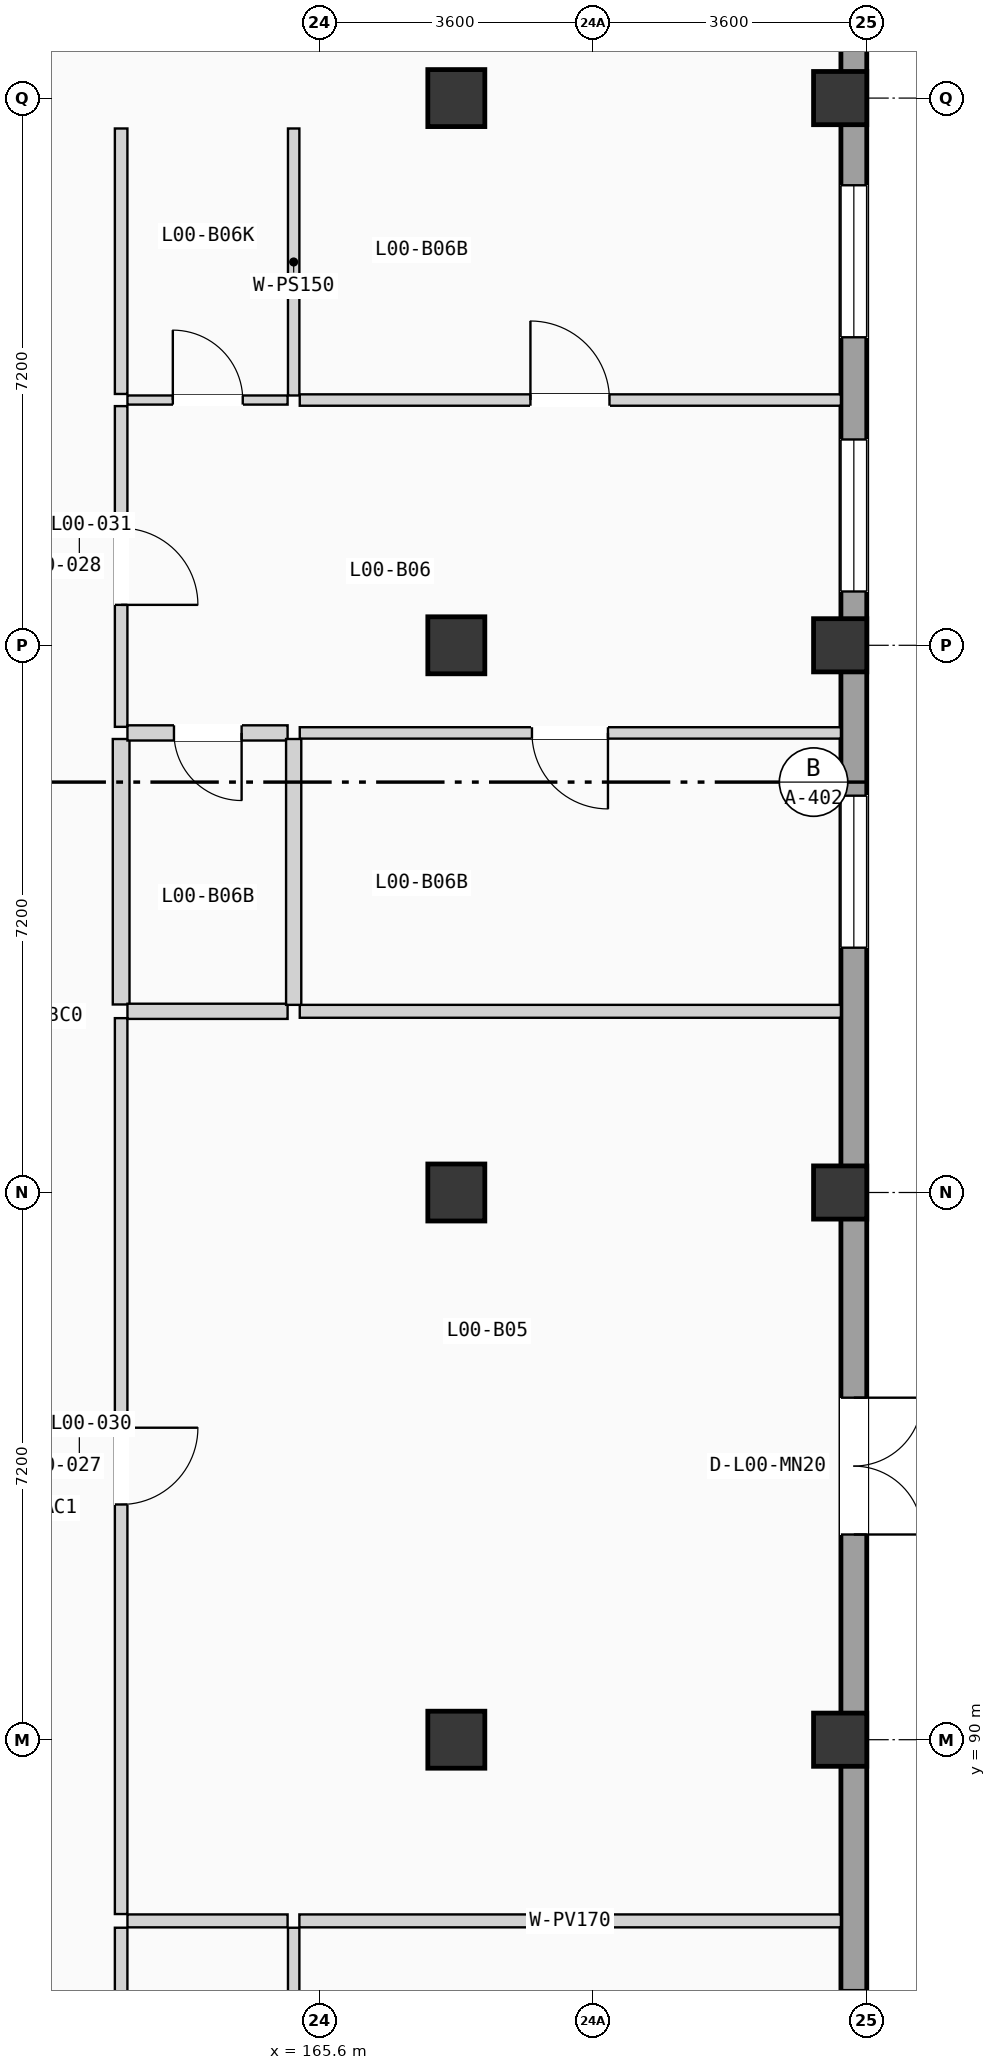
"""IFC4 building model, lengths in metres.
Left out: names, types, materials, properties, quantities, classifications, styles, units other than length and angle.
Written with IfcOpenShell. Run it as: python <this file> out.ifc"""

import sys

from ifc_helpers import new_model, si_unit, direction, frame, frame_2d, origin, origin_2d, place, context, subcontext, project, spatial, rectangle, extrude, element, fill, save


model = new_model("IFC4")
c1 = context("Model", 3, precision=1e-05, world=origin(), true_north=direction((0.0, 1.0)))
c2 = subcontext(c1, "Body", "Model", "MODEL_VIEW")
j1 = project(units=[si_unit("LENGTHUNIT", "METRE"), si_unit("PLANEANGLEUNIT", "RADIAN")], contexts=[c1])
p1 = place(None, origin())
s1 = spatial("IfcSite", under=j1, at=p1, CompositionType="ELEMENT")
p2 = place(p1, origin())
s2 = spatial("IfcBuilding", under=s1, at=p2, CompositionType="ELEMENT")
p3 = place(p2, origin())
s3 = spatial("IfcBuildingStorey", under=s2, at=p3, CompositionType="ELEMENT", Elevation=0.0)
for number, where, z_axis, x_axis in (
    (1, (167.4, 90.0, 0.0), (0.0, 0.0, 1.0), (1.0, 0.0, 0.0)),
    (2, (167.4, 97.2, 0.0), (0.0, 0.0, 1.0), (1.0, 0.0, 0.0)),
    (3, (167.4, 104.4, 0.0), (0.0, 0.0, 1.0), (1.0, 0.0, 0.0)),
    (4, (167.4, 111.6, 0.0), (0.0, 0.0, 1.0), (1.0, 0.0, 0.0)),
):
    element("IfcColumn", number, at=place(p3, frame(where, z_axis=z_axis, x_axis=x_axis)), inside=s3, PredefinedType="COLUMN", context=c2, shape_type="SweptSolid", body=[
        extrude(rectangle(XDim=0.75, YDim=0.75, at=origin_2d()), origin(), (0.0, 0.0, 1.0), 4.9),
    ])
for number, where, z_axis, x_axis in (
    (5, (172.45, 90.0, 0.0), (0.0, 0.0, 1.0), (1.0, 0.0, 0.0)),
    (6, (172.45, 97.2, 0.0), (0.0, 0.0, 1.0), (1.0, 0.0, 0.0)),
    (7, (172.45, 104.4, 0.0), (0.0, 0.0, 1.0), (1.0, 0.0, 0.0)),
    (8, (172.45, 111.6, 0.0), (0.0, 0.0, 1.0), (1.0, 0.0, 0.0)),
):
    element("IfcColumn", number, at=place(p3, frame(where, z_axis=z_axis, x_axis=x_axis)), inside=s3, PredefinedType="COLUMN", context=c2, shape_type="SweptSolid", body=[
        extrude(rectangle(XDim=0.7, YDim=0.7, at=origin_2d()), origin(), (0.0, 0.0, 1.0), 4.9),
    ])
p4 = place(p3, frame((172.63, 68.74, 0.0), z_axis=(0.0, 0.0, 1.0), x_axis=(0.0, 1.0, 0.0)))
e9 = element("IfcWall", 9, at=p4, inside=s3, PredefinedType="SOLIDWALL", context=c2, shape_type="SweptSolid", body=[
    extrude(rectangle(XDim=49.72, YDim=0.34, at=frame_2d((24.86, 0.0))), origin(), (0.0, 0.0, 1.0), 4.64),
])
p5 = place(p4, frame((23.96, 0.0, 0.0)))
e10 = element("IfcOpeningElement", 10, at=p5, cuts=e9, PredefinedType="OPENING", context=c2, shape_type="SweptSolid", body=[
    extrude(rectangle(XDim=1.8, YDim=2.35, at=frame_2d((0.9, 1.175))), frame((0.0, 0.18, 0.0), z_axis=(0.0, -1.0, 0.0), x_axis=(1.0, 0.0, 0.0)), (0.0, 0.0, 1.0), 0.36),
])
p6 = place(p4, frame((11.427, 0.0, 0.9)))
e11 = element("IfcOpeningElement", 11, at=p6, cuts=e9, PredefinedType="OPENING", context=c2, shape_type="SweptSolid", body=[
    extrude(rectangle(XDim=1.85, YDim=1.5, at=frame_2d((0.925, 0.75))), frame((0.0, 0.18, 0.0), z_axis=(0.0, -1.0, 0.0), x_axis=(1.0, 0.0, 0.0)), (0.0, 0.0, 1.0), 0.36),
])
p7 = place(p4, frame((8.082, 0.0, 0.9)))
e12 = element("IfcOpeningElement", 12, at=p7, cuts=e9, PredefinedType="OPENING", context=c2, shape_type="SweptSolid", body=[
    extrude(rectangle(XDim=1.85, YDim=1.65, at=frame_2d((0.925, 0.825))), frame((0.0, 0.18, 0.0), z_axis=(0.0, -1.0, 0.0), x_axis=(1.0, 0.0, 0.0)), (0.0, 0.0, 1.0), 0.36),
])
p8 = place(p4, frame((16.115, 0.0, 0.9)))
e13 = element("IfcOpeningElement", 13, at=p8, cuts=e9, PredefinedType="OPENING", context=c2, shape_type="SweptSolid", body=[
    extrude(rectangle(XDim=1.85, YDim=1.8, at=frame_2d((0.925, 0.9))), frame((0.0, 0.18, 0.0), z_axis=(0.0, -1.0, 0.0), x_axis=(1.0, 0.0, 0.0)), (0.0, 0.0, 1.0), 0.36),
])
p9 = place(p4, frame((36.368, 0.0, 0.9)))
e14 = element("IfcOpeningElement", 14, at=p9, cuts=e9, PredefinedType="OPENING", context=c2, shape_type="SweptSolid", body=[
    extrude(rectangle(XDim=2.0, YDim=1.2, at=frame_2d((1.0, 0.6))), frame((0.0, 0.18, 0.0), z_axis=(0.0, -1.0, 0.0), x_axis=(1.0, 0.0, 0.0)), (0.0, 0.0, 1.0), 0.36),
])
p10 = place(p4, frame((31.681, 0.0, 0.9)))
e15 = element("IfcOpeningElement", 15, at=p10, cuts=e9, PredefinedType="OPENING", context=c2, shape_type="SweptSolid", body=[
    extrude(rectangle(XDim=2.0, YDim=1.35, at=frame_2d((1.0, 0.675))), frame((0.0, 0.18, 0.0), z_axis=(0.0, -1.0, 0.0), x_axis=(1.0, 0.0, 0.0)), (0.0, 0.0, 1.0), 0.36),
])
p11 = place(p4, frame((39.713, 0.0, 0.9)))
e16 = element("IfcOpeningElement", 16, at=p11, cuts=e9, PredefinedType="OPENING", context=c2, shape_type="SweptSolid", body=[
    extrude(rectangle(XDim=2.0, YDim=1.5, at=frame_2d((1.0, 0.75))), frame((0.0, 0.18, 0.0), z_axis=(0.0, -1.0, 0.0), x_axis=(1.0, 0.0, 0.0)), (0.0, 0.0, 1.0), 0.36),
])
p12 = place(p3, frame((162.99, 84.033, 0.0), z_axis=(0.0, 0.0, 1.0), x_axis=(0.0, 1.0, 0.0)))
e17 = element("IfcWall", 17, at=p12, inside=s3, PredefinedType="PARTITIONING", context=c2, shape_type="SweptSolid", body=[
    extrude(rectangle(XDim=3.493, YDim=0.165, at=frame_2d((1.747, 0.0))), origin(), (0.0, 0.0, 1.0), 3.84),
])
p13 = place(p3, frame((162.99, 87.706, 0.0), z_axis=(0.0, 0.0, 1.0), x_axis=(0.0, 1.0, 0.0)))
e18 = element("IfcWall", 18, at=p13, inside=s3, PredefinedType="PARTITIONING", context=c2, shape_type="SweptSolid", body=[
    extrude(rectangle(XDim=11.788, YDim=0.165, at=frame_2d((5.894, 0.0))), origin(), (0.0, 0.0, 1.0), 3.84),
])
p14 = place(p13, frame((5.389, 0.0, 0.0)))
e19 = element("IfcOpeningElement", 19, at=p14, cuts=e18, PredefinedType="OPENING", context=c2, shape_type="SweptSolid", body=[
    extrude(rectangle(XDim=1.01, YDim=2.11, at=frame_2d((0.505, 1.055))), frame((0.0, 0.093, 0.0), z_axis=(0.0, -1.0, 0.0), x_axis=(1.0, 0.0, 0.0)), (0.0, 0.0, 1.0), 0.185),
])
p15 = place(p3, frame((162.99, 103.327, 0.0), z_axis=(0.0, 0.0, 1.0), x_axis=(0.0, 1.0, 0.0)))
e20 = element("IfcWall", 20, at=p15, inside=s3, PredefinedType="PARTITIONING", context=c2, shape_type="SweptSolid", body=[
    extrude(rectangle(XDim=4.22, YDim=0.165, at=frame_2d((2.11, 0.0))), origin(), (0.0, 0.0, 1.0), 3.84),
])
p16 = place(p15, frame((1.605, 0.0, 0.0)))
e21 = element("IfcOpeningElement", 21, at=p16, cuts=e20, PredefinedType="OPENING", context=c2, shape_type="SweptSolid", body=[
    extrude(rectangle(XDim=1.01, YDim=2.11, at=frame_2d((0.505, 1.055))), frame((0.0, 0.093, 0.0), z_axis=(0.0, -1.0, 0.0), x_axis=(1.0, 0.0, 0.0)), (0.0, 0.0, 1.0), 0.185),
])
p17 = place(p3, frame((162.99, 99.674, 0.0), z_axis=(0.0, 0.0, 1.0), x_axis=(0.0, 1.0, 0.0)))
e22 = element("IfcWall", 22, at=p17, inside=s3, PredefinedType="PLUMBINGWALL", context=c2, shape_type="SweptSolid", body=[
    extrude(rectangle(XDim=3.493, YDim=0.22, at=frame_2d((1.747, 0.0))), origin(), (0.0, 0.0, 1.0), 3.84),
])
p18 = place(p3, frame((162.99, 107.707, 0.0), z_axis=(0.0, 0.0, 1.0), x_axis=(0.0, 1.0, 0.0)))
e23 = element("IfcWall", 23, at=p18, inside=s3, PredefinedType="PARTITIONING", context=c2, shape_type="SweptSolid", body=[
    extrude(rectangle(XDim=3.493, YDim=0.165, at=frame_2d((1.747, 0.0))), origin(), (0.0, 0.0, 1.0), 3.84),
])
p19 = place(p3, frame((165.26, 84.013, 0.0), z_axis=(0.0, 0.0, 1.0), x_axis=(0.0, 1.0, 0.0)))
e24 = element("IfcWall", 24, at=p19, inside=s3, PredefinedType="PARTITIONING", context=c2, shape_type="SweptSolid", body=[
    extrude(rectangle(XDim=3.513, YDim=0.15, at=frame_2d((1.756, 0.0))), origin(), (0.0, 0.0, 1.0), 3.84),
])
p20 = place(p3, frame((163.073, 87.616, 0.0), z_axis=(0.0, 0.0, 1.0), x_axis=(1.0, 0.0, 0.0)))
e25 = element("IfcWall", 25, at=p20, inside=s3, PredefinedType="PARTITIONING", context=c2, shape_type="SweptSolid", body=[
    extrude(rectangle(XDim=2.107, YDim=0.17, at=frame_2d((1.053, 0.0))), origin(), (0.0, 0.0, 1.0), 3.84),
])
p21 = place(p3, frame((165.335, 87.616, 0.0), z_axis=(0.0, 0.0, 1.0), x_axis=(1.0, 0.0, 0.0)))
e26 = element("IfcWall", 26, at=p21, inside=s3, PredefinedType="PARTITIONING", context=c2, shape_type="SweptSolid", body=[
    extrude(rectangle(XDim=7.125, YDim=0.17, at=frame_2d((3.562, 0.0))), origin(), (0.0, 0.0, 1.0), 3.84),
])
p22 = place(p3, frame((163.073, 99.584, 0.0), z_axis=(0.0, 0.0, 1.0), x_axis=(1.0, 0.0, 0.0)))
e27 = element("IfcWall", 27, at=p22, inside=s3, PredefinedType="PLUMBINGWALL", context=c2, shape_type="SweptSolid", body=[
    extrude(rectangle(XDim=2.107, YDim=0.2, at=frame_2d((1.053, 0.0))), origin(), (0.0, 0.0, 1.0), 3.84),
])
p23 = place(p3, frame((165.34, 99.584, 0.0), z_axis=(0.0, 0.0, 1.0), x_axis=(1.0, 0.0, 0.0)))
e28 = element("IfcWall", 28, at=p23, inside=s3, PredefinedType="PARTITIONING", context=c2, shape_type="SweptSolid", body=[
    extrude(rectangle(XDim=7.12, YDim=0.17, at=frame_2d((3.56, 0.0))), origin(), (0.0, 0.0, 1.0), 3.84),
])
p24 = place(p3, frame((163.073, 103.247, 0.0), z_axis=(0.0, 0.0, 1.0), x_axis=(1.0, 0.0, 0.0)))
e29 = element("IfcWall", 29, at=p24, inside=s3, PredefinedType="PLUMBINGWALL", context=c2, shape_type="SweptSolid", body=[
    extrude(rectangle(XDim=2.107, YDim=0.2, at=frame_2d((1.053, 0.0))), origin(), (0.0, 0.0, 1.0), 3.84),
])
p25 = place(p24, frame((0.612, 0.0, 0.0)))
e30 = element("IfcOpeningElement", 30, at=p25, cuts=e29, PredefinedType="OPENING", context=c2, shape_type="SweptSolid", body=[
    extrude(rectangle(XDim=0.89, YDim=2.03, at=frame_2d((0.445, 1.015))), frame((0.0, 0.11, 0.0), z_axis=(0.0, -1.0, 0.0), x_axis=(1.0, 0.0, 0.0)), (0.0, 0.0, 1.0), 0.22),
])
p26 = place(p3, frame((163.073, 107.627, 0.0), z_axis=(0.0, 0.0, 1.0), x_axis=(1.0, 0.0, 0.0)))
e31 = element("IfcWall", 31, at=p26, inside=s3, PredefinedType="PARTITIONING", context=c2, shape_type="SweptSolid", body=[
    extrude(rectangle(XDim=2.107, YDim=0.12, at=frame_2d((1.053, 0.0))), origin(), (0.0, 0.0, 1.0), 3.84),
])
p27 = place(p26, frame((0.597, 0.0, 0.0)))
e32 = element("IfcOpeningElement", 32, at=p27, cuts=e31, PredefinedType="OPENING", context=c2, shape_type="SweptSolid", body=[
    extrude(rectangle(XDim=0.92, YDim=2.02, at=frame_2d((0.46, 1.01))), frame((0.0, 0.07, 0.0), z_axis=(0.0, -1.0, 0.0), x_axis=(1.0, 0.0, 0.0)), (0.0, 0.0, 1.0), 0.14),
])
p28 = place(p3, frame((165.34, 103.247, 0.0), z_axis=(0.0, 0.0, 1.0), x_axis=(1.0, 0.0, 0.0)))
e33 = element("IfcWall", 33, at=p28, inside=s3, PredefinedType="PARTITIONING", context=c2, shape_type="SweptSolid", body=[
    extrude(rectangle(XDim=7.12, YDim=0.15, at=frame_2d((3.56, 0.0))), origin(), (0.0, 0.0, 1.0), 3.84),
])
p29 = place(p28, frame((3.055, 0.0, 0.0)))
e34 = element("IfcOpeningElement", 34, at=p29, cuts=e33, PredefinedType="OPENING", context=c2, shape_type="SweptSolid", body=[
    extrude(rectangle(XDim=1.0, YDim=2.06, at=frame_2d((0.5, 1.03))), frame((0.0, 0.085, 0.0), z_axis=(0.0, -1.0, 0.0), x_axis=(1.0, 0.0, 0.0)), (0.0, 0.0, 1.0), 0.17),
])
p30 = place(p3, frame((165.34, 107.627, 0.0), z_axis=(0.0, 0.0, 1.0), x_axis=(1.0, 0.0, 0.0)))
e35 = element("IfcWall", 35, at=p30, inside=s3, PredefinedType="PARTITIONING", context=c2, shape_type="SweptSolid", body=[
    extrude(rectangle(XDim=7.12, YDim=0.15, at=frame_2d((3.56, 0.0))), origin(), (0.0, 0.0, 1.0), 3.84),
])
p31 = place(p30, frame((3.035, 0.0, 0.0)))
e36 = element("IfcOpeningElement", 36, at=p31, cuts=e35, PredefinedType="OPENING", context=c2, shape_type="SweptSolid", body=[
    extrude(rectangle(XDim=1.04, YDim=2.08, at=frame_2d((0.52, 1.04))), frame((0.0, 0.085, 0.0), z_axis=(0.0, -1.0, 0.0), x_axis=(1.0, 0.0, 0.0)), (0.0, 0.0, 1.0), 0.17),
])
p32 = place(p3, frame((165.26, 99.669, 0.0), z_axis=(0.0, 0.0, 1.0), x_axis=(0.0, 1.0, 0.0)))
e37 = element("IfcWall", 37, at=p32, inside=s3, PredefinedType="PLUMBINGWALL", context=c2, shape_type="SweptSolid", body=[
    extrude(rectangle(XDim=3.498, YDim=0.2, at=frame_2d((1.749, 0.0))), origin(), (0.0, 0.0, 1.0), 3.84),
])
p33 = place(p3, frame((165.26, 107.687, 0.0), z_axis=(0.0, 0.0, 1.0), x_axis=(0.0, 1.0, 0.0)))
e38 = element("IfcWall", 38, at=p33, inside=s3, PredefinedType="PARTITIONING", context=c2, shape_type="SweptSolid", body=[
    extrude(rectangle(XDim=3.513, YDim=0.15, at=frame_2d((1.756, 0.0))), origin(), (0.0, 0.0, 1.0), 3.84),
])
p34 = place(p5, frame((1.8, 0.0, 0.0), z_axis=(0.0, 0.0, 1.0), x_axis=(-1.0, 0.0, 0.0)))
e39 = element("IfcDoor", 39, at=p34, inside=s3, OperationType="DOUBLE_DOOR_SINGLE_SWING", PredefinedType="DOOR", context=c2, shape_type="SweptSolid", body=[
    extrude(rectangle(XDim=1.8, YDim=2.35, at=frame_2d((0.9, 1.175))), frame((0.0, 0.025, 0.0), z_axis=(0.0, -1.0, 0.0), x_axis=(1.0, 0.0, 0.0)), (0.0, 0.0, 1.0), 0.05),
])
fill(e10, e39)
p35 = place(p9, origin())
e40 = element("IfcWindow", 40, at=p35, inside=s3, PartitioningType="DOUBLE_PANEL_VERTICAL", PredefinedType="WINDOW", context=c2, shape_type="SweptSolid", body=[
    extrude(rectangle(XDim=2.0, YDim=1.2, at=frame_2d((1.0, 0.6))), frame((0.0, 0.03, 0.0), z_axis=(0.0, -1.0, 0.0), x_axis=(1.0, 0.0, 0.0)), (0.0, 0.0, 1.0), 0.06),
])
fill(e14, e40)
p36 = place(p10, origin())
e41 = element("IfcWindow", 41, at=p36, inside=s3, PartitioningType="DOUBLE_PANEL_VERTICAL", PredefinedType="WINDOW", context=c2, shape_type="SweptSolid", body=[
    extrude(rectangle(XDim=2.0, YDim=1.35, at=frame_2d((1.0, 0.675))), frame((0.0, 0.03, 0.0), z_axis=(0.0, -1.0, 0.0), x_axis=(1.0, 0.0, 0.0)), (0.0, 0.0, 1.0), 0.06),
])
fill(e15, e41)
p37 = place(p11, origin())
e42 = element("IfcWindow", 42, at=p37, inside=s3, PartitioningType="DOUBLE_PANEL_VERTICAL", PredefinedType="WINDOW", context=c2, shape_type="SweptSolid", body=[
    extrude(rectangle(XDim=2.0, YDim=1.5, at=frame_2d((1.0, 0.75))), frame((0.0, 0.03, 0.0), z_axis=(0.0, -1.0, 0.0), x_axis=(1.0, 0.0, 0.0)), (0.0, 0.0, 1.0), 0.06),
])
fill(e16, e42)
p38 = place(p14, frame((1.01, 0.0, 0.0), z_axis=(0.0, 0.0, 1.0), x_axis=(-1.0, 0.0, 0.0)))
e43 = element("IfcDoor", 43, at=p38, inside=s3, OperationType="SINGLE_SWING_RIGHT", PredefinedType="DOOR", context=c2, shape_type="SweptSolid", body=[
    extrude(rectangle(XDim=1.01, YDim=2.11, at=frame_2d((0.505, 1.055))), frame((0.0, 0.025, 0.0), z_axis=(0.0, -1.0, 0.0), x_axis=(1.0, 0.0, 0.0)), (0.0, 0.0, 1.0), 0.05),
])
fill(e19, e43)
p39 = place(p16, frame((1.01, 0.0, 0.0), z_axis=(0.0, 0.0, 1.0), x_axis=(-1.0, 0.0, 0.0)))
e44 = element("IfcDoor", 44, at=p39, inside=s3, OperationType="SINGLE_SWING_LEFT", PredefinedType="DOOR", context=c2, shape_type="SweptSolid", body=[
    extrude(rectangle(XDim=1.01, YDim=2.11, at=frame_2d((0.505, 1.055))), frame((0.0, 0.025, 0.0), z_axis=(0.0, -1.0, 0.0), x_axis=(1.0, 0.0, 0.0)), (0.0, 0.0, 1.0), 0.05),
])
fill(e21, e44)
p40 = place(p25, frame((0.89, 0.0, 0.0), z_axis=(0.0, 0.0, 1.0), x_axis=(-1.0, 0.0, 0.0)))
e45 = element("IfcDoor", 45, at=p40, inside=s3, OperationType="SINGLE_SWING_RIGHT", PredefinedType="DOOR", context=c2, shape_type="SweptSolid", body=[
    extrude(rectangle(XDim=0.89, YDim=2.03, at=frame_2d((0.445, 1.015))), frame((0.0, 0.025, 0.0), z_axis=(0.0, -1.0, 0.0), x_axis=(1.0, 0.0, 0.0)), (0.0, 0.0, 1.0), 0.05),
])
fill(e30, e45)
p41 = place(p27, origin())
e46 = element("IfcDoor", 46, at=p41, inside=s3, OperationType="SINGLE_SWING_LEFT", PredefinedType="DOOR", context=c2, shape_type="SweptSolid", body=[
    extrude(rectangle(XDim=0.92, YDim=2.02, at=frame_2d((0.46, 1.01))), frame((0.0, 0.025, 0.0), z_axis=(0.0, -1.0, 0.0), x_axis=(1.0, 0.0, 0.0)), (0.0, 0.0, 1.0), 0.05),
])
fill(e32, e46)
p42 = place(p29, frame((1.0, 0.0, 0.0), z_axis=(0.0, 0.0, 1.0), x_axis=(-1.0, 0.0, 0.0)))
e47 = element("IfcDoor", 47, at=p42, inside=s3, OperationType="SINGLE_SWING_RIGHT", PredefinedType="DOOR", context=c2, shape_type="SweptSolid", body=[
    extrude(rectangle(XDim=1.0, YDim=2.06, at=frame_2d((0.5, 1.03))), frame((0.0, 0.025, 0.0), z_axis=(0.0, -1.0, 0.0), x_axis=(1.0, 0.0, 0.0)), (0.0, 0.0, 1.0), 0.05),
])
fill(e34, e47)
p43 = place(p31, origin())
e48 = element("IfcDoor", 48, at=p43, inside=s3, OperationType="SINGLE_SWING_LEFT", PredefinedType="DOOR", context=c2, shape_type="SweptSolid", body=[
    extrude(rectangle(XDim=1.04, YDim=2.08, at=frame_2d((0.52, 1.04))), frame((0.0, 0.025, 0.0), z_axis=(0.0, -1.0, 0.0), x_axis=(1.0, 0.0, 0.0)), (0.0, 0.0, 1.0), 0.05),
])
fill(e36, e48)
save(model, sys.argv[1])
